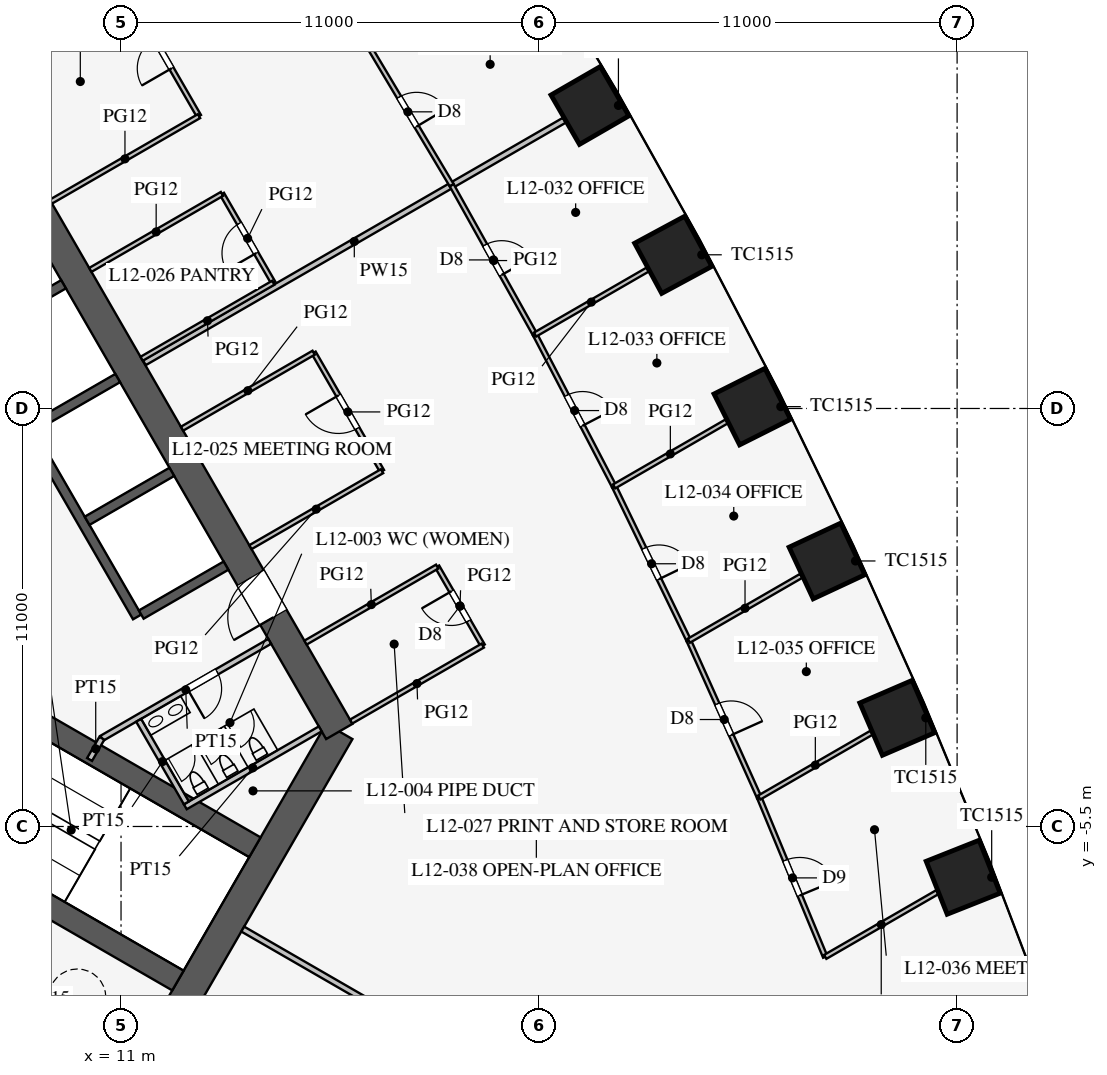
"""IFC4 building model, lengths in metres.
Left out: names, types, materials, properties, quantities, classifications, styles, units other than length and angle.
Written with IfcOpenShell. Run it as: python <this file> out.ifc"""

import sys

from ifc_helpers import new_model, si_unit, direction, frame, frame_2d, origin, origin_2d, place, context, subcontext, project, spatial, rectangle, extrude, element, fill, save


model = new_model("IFC4")
c1 = context("Model", 3, precision=1e-05, world=origin(), true_north=direction((0.0, 1.0)))
c2 = subcontext(c1, "Body", "Model", "MODEL_VIEW")
j1 = project(units=[si_unit("LENGTHUNIT", "METRE"), si_unit("PLANEANGLEUNIT", "RADIAN")], contexts=[c1])
p1 = place(None, origin())
s1 = spatial("IfcSite", under=j1, at=p1, CompositionType="ELEMENT")
p2 = place(p1, origin())
s2 = spatial("IfcBuilding", under=s1, at=p2, CompositionType="ELEMENT")
p3 = place(p2, frame((0.0, 0.0, 54.3)))
s3 = spatial("IfcBuildingStorey", under=s2, at=p3, CompositionType="ELEMENT", Elevation=54.3)
for number, where, z_axis, x_axis in (
    (1, (33.16, -6.836, 0.0), (0.0, 0.0, 1.0), (-0.369, 0.929, 0.0)),
    (2, (31.426, -2.641, 0.0), (0.0, 0.0, 1.0), (-0.396, 0.918, 0.0)),
    (3, (29.576, 1.487, 0.0), (0.0, 0.0, 1.0), (-0.423, 0.906, 0.0)),
    (4, (27.611, 5.549, 0.0), (0.0, 0.0, 1.0), (-0.449, 0.894, 0.0)),
    (5, (25.531, 9.544, 0.0), (0.0, 0.0, 1.0), (-0.475, 0.88, 0.0)),
    (6, (23.338, 13.474, 0.0), (0.0, 0.0, 1.0), (-0.5, 0.866, 0.0)),
):
    element("IfcColumn", number, at=place(p3, frame(where, z_axis=z_axis, x_axis=x_axis)), inside=s3, PredefinedType="COLUMN", context=c2, shape_type="SweptSolid", body=[
        extrude(rectangle(XDim=1.5, YDim=1.5, at=origin_2d()), origin(), (0.0, 0.0, 1.0), 4.2),
    ])
p4 = place(p3, frame((10.97, -13.0, 0.0), z_axis=(0.0, 0.0, 1.0), x_axis=(0.499995765644, 0.866027848477, 0.0)))
e7 = element("IfcWall", 7, at=p4, inside=s3, PredefinedType="SHEAR", context=c2, shape_type="SweptSolid", body=[
    extrude(rectangle(XDim=11.547, YDim=0.8, at=frame_2d((5.773, 0.0))), origin(), (0.0, 0.0, 1.0), 4.2),
])
p5 = place(p3, frame((16.743, -3.0, 0.0), z_axis=(0.0, 0.0, 1.0), x_axis=(-0.500002442456, 0.866023993627, 0.0)))
e8 = element("IfcWall", 8, at=p5, inside=s3, PredefinedType="SHEAR", context=c2, shape_type="SweptSolid", body=[
    extrude(rectangle(XDim=21.939, YDim=0.8, at=frame_2d((10.97, 0.0))), origin(), (0.0, 0.0, 1.0), 4.2),
])
p6 = place(p5, frame((17.27, 0.0, 0.0)))
e9 = element("IfcOpeningElement", 9, at=p6, cuts=e8, PredefinedType="OPENING", context=c2, shape_type="SweptSolid", body=[
    extrude(rectangle(XDim=1.2, YDim=2.1, at=frame_2d((0.6, 1.05))), frame((0.0, 0.41, 0.0), z_axis=(0.0, -1.0, 0.0), x_axis=(1.0, 0.0, 0.0)), (0.0, 0.0, 1.0), 0.82),
])
p7 = place(p5, frame((3.47, 0.0, 0.0)))
e10 = element("IfcOpeningElement", 10, at=p7, cuts=e8, PredefinedType="OPENING", context=c2, shape_type="SweptSolid", body=[
    extrude(rectangle(XDim=1.2, YDim=2.1, at=frame_2d((0.6, 1.05))), frame((0.0, 0.41, 0.0), z_axis=(0.0, -1.0, 0.0), x_axis=(1.0, 0.0, 0.0)), (0.0, 0.0, 1.0), 0.82),
])
p8 = place(p3, frame((11.424, 0.014, 0.0), z_axis=(0.0, 0.0, 1.0), x_axis=(-0.500001763848, 0.866024385424, 0.0)))
e11 = element("IfcWall", 11, at=p8, inside=s3, PredefinedType="SHEAR", context=c2, shape_type="SweptSolid", body=[
    extrude(rectangle(XDim=11.4, YDim=0.25, at=frame_2d((5.7, 0.0))), origin(), (0.0, 0.0, 1.0), 4.2),
])
for number, where, z_axis, x_axis in (
    (12, (11.532, 0.076, 0.0), (0.0, 0.0, 1.0), (0.866, 0.5, 0.0)),
    (13, (10.107, 2.544, 0.0), (0.0, 0.0, 1.0), (0.866, 0.5, 0.0)),
    (14, (8.682, 5.012, 0.0), (0.0, 0.0, 1.0), (0.866, 0.5, 0.0)),
    (15, (7.257, 7.481, 0.0), (0.0, 0.0, 1.0), (0.866, 0.5, 0.0)),
):
    element("IfcWall", number, at=place(p3, frame(where, z_axis=z_axis, x_axis=x_axis)), inside=s3, PredefinedType="SHEAR", context=c2, shape_type="SweptSolid", body=[
        extrude(rectangle(XDim=2.575, YDim=0.25, at=frame_2d((1.288, 0.0))), origin(), (0.0, 0.0, 1.0), 4.2),
    ])
for number, where, z_axis, x_axis in (
    (16, (4.638, -5.016, 0.0), (0.0, 0.0, 1.0), (0.866, -0.5, 0.0)),
    (17, (6.663, -1.509, 0.0), (0.0, 0.0, 1.0), (0.866, -0.5, 0.0)),
):
    element("IfcWall", number, at=place(p3, frame(where, z_axis=z_axis, x_axis=x_axis)), inside=s3, PredefinedType="SHEAR", context=c2, shape_type="SweptSolid", body=[
        extrude(rectangle(XDim=9.075, YDim=0.6, at=frame_2d((4.538, 0.0))), origin(), (0.0, 0.0, 1.0), 4.2),
    ])
p9 = place(p3, frame((10.495, -3.178, 0.0), z_axis=(0.0, 0.0, 1.0), x_axis=(0.86602216432, 0.500005610874, 0.0)))
e18 = element("IfcWall", 18, at=p9, inside=s3, PredefinedType="PARTITIONING", context=c2, shape_type="SweptSolid", body=[
    extrude(rectangle(XDim=5.1, YDim=0.15, at=frame_2d((2.55, 0.0))), origin(), (0.0, 0.0, 1.0), 4.0),
])
p10 = place(p9, frame((2.6, 0.0, 0.0)))
e19 = element("IfcOpeningElement", 19, at=p10, cuts=e18, PredefinedType="OPENING", context=c2, shape_type="SweptSolid", body=[
    extrude(rectangle(XDim=0.9, YDim=2.1, at=frame_2d((0.45, 1.05))), frame((0.0, 0.085, 0.0), z_axis=(0.0, -1.0, 0.0), x_axis=(1.0, 0.0, 0.0)), (0.0, 0.0, 1.0), 0.17),
])
p11 = place(p3, frame((10.495, -3.178, 0.0), z_axis=(0.0, 0.0, 1.0), x_axis=(-0.499842556608, -0.866116284689, 0.0)))
e20 = element("IfcWall", 20, at=p11, inside=s3, PredefinedType="PARTITIONING", context=c2, shape_type="SweptSolid", body=[
    extrude(rectangle(XDim=0.645, YDim=0.15, at=frame_2d((0.323, 0.0))), origin(), (0.0, 0.0, 1.0), 4.0),
])
p12 = place(p3, frame((12.691, -4.982, 0.0), z_axis=(0.0, 0.0, 1.0), x_axis=(0.8660249478, 0.500000789788, 0.0)))
e21 = element("IfcWall", 21, at=p12, inside=s3, PredefinedType="PARTITIONING", context=c2, shape_type="SweptSolid", body=[
    extrude(rectangle(XDim=4.1, YDim=0.15, at=frame_2d((2.05, 0.0))), origin(), (0.0, 0.0, 1.0), 4.0),
])
p13 = place(p3, frame((11.464, -2.706, 0.0), z_axis=(0.0, 0.0, 1.0), x_axis=(0.50001992892, -0.866013897511, 0.0)))
e22 = element("IfcWall", 22, at=p13, inside=s3, PredefinedType="PARTITIONING", context=c2, shape_type="SweptSolid", body=[
    extrude(rectangle(XDim=2.51, YDim=0.15, at=frame_2d((1.255, 0.0))), origin(), (0.0, 0.0, 1.0), 4.0),
])
p14 = place(p3, frame((14.203, -8.2, 0.0), z_axis=(0.0, 0.0, 1.0), x_axis=(0.866024965723, -0.500000758745, 0.0)))
e23 = element("IfcWall", 23, at=p14, inside=s3, PredefinedType="PARTITIONING", context=c2, shape_type="SweptSolid", body=[
    extrude(rectangle(XDim=18.25, YDim=0.15, at=frame_2d((9.125, 0.0))), origin(), (0.0, 0.0, 1.0), 2.3),
])
p15 = place(p3, frame((11.613, 6.705, 0.0), z_axis=(0.0, 0.0, 1.0), x_axis=(0.86602785495, 0.499995754432, 0.0)))
e24 = element("IfcWall", 24, at=p15, inside=s3, PredefinedType="PARTITIONING", context=c2, shape_type="SweptSolid", body=[
    extrude(rectangle(XDim=12.759, YDim=0.15, at=frame_2d((6.379, 0.0))), origin(), (0.0, 0.0, 1.0), 3.2),
])
p16 = place(p3, frame((15.006, 8.808, 0.0), z_axis=(0.0, 0.0, 1.0), x_axis=(-0.500048589285, 0.86599734893, 0.0)))
e25 = element("IfcWall", 25, at=p16, inside=s3, PredefinedType="PARTITIONING", context=c2, shape_type="SweptSolid", body=[
    extrude(rectangle(XDim=2.7, YDim=0.12, at=frame_2d((1.35, 0.0))), origin(), (0.0, 0.0, 1.0), 2.9),
])
p17 = place(p16, frame((0.9, 0.0, 0.15)))
e26 = element("IfcOpeningElement", 26, at=p17, cuts=e25, PredefinedType="OPENING", context=c2, shape_type="SweptSolid", body=[
    extrude(rectangle(XDim=0.9, YDim=2.1, at=frame_2d((0.45, 1.05))), frame((0.0, 0.07, 0.0), z_axis=(0.0, -1.0, 0.0), x_axis=(1.0, 0.0, 0.0)), (0.0, 0.0, 1.0), 0.14),
])
p18 = place(p3, frame((13.052, 13.194, 0.0), z_axis=(0.0, 0.0, 1.0), x_axis=(-0.499977259774, 0.866038532462, 0.0)))
e27 = element("IfcWall", 27, at=p18, inside=s3, PredefinedType="PARTITIONING", context=c2, shape_type="SweptSolid", body=[
    extrude(rectangle(XDim=4.7, YDim=0.12, at=frame_2d((2.35, 0.0))), origin(), (0.0, 0.0, 1.0), 2.9),
])
p19 = place(p18, frame((1.45, 0.0, 0.15)))
e28 = element("IfcOpeningElement", 28, at=p19, cuts=e27, PredefinedType="OPENING", context=c2, shape_type="SweptSolid", body=[
    extrude(rectangle(XDim=1.8, YDim=2.1, at=frame_2d((0.9, 1.05))), frame((0.0, 0.07, 0.0), z_axis=(0.0, -1.0, 0.0), x_axis=(1.0, 0.0, 0.0)), (0.0, 0.0, 1.0), 0.14),
])
p20 = place(p3, frame((20.519, -0.74, 0.0), z_axis=(0.0, 0.0, 1.0), x_axis=(-0.499957262057, 0.866050077142, 0.0)))
e29 = element("IfcWall", 29, at=p20, inside=s3, PredefinedType="PARTITIONING", context=c2, shape_type="SweptSolid", body=[
    extrude(rectangle(XDim=2.4, YDim=0.12, at=frame_2d((1.2, 0.0))), origin(), (0.0, 0.0, 1.0), 2.9),
])
p21 = place(p20, frame((0.75, 0.0, 0.15)))
e30 = element("IfcOpeningElement", 30, at=p21, cuts=e29, PredefinedType="OPENING", context=c2, shape_type="SweptSolid", body=[
    extrude(rectangle(XDim=0.9, YDim=2.1, at=frame_2d((0.45, 1.05))), frame((0.0, 0.07, 0.0), z_axis=(0.0, -1.0, 0.0), x_axis=(1.0, 0.0, 0.0)), (0.0, 0.0, 1.0), 0.14),
])
p22 = place(p3, frame((17.869, 3.85, 0.0), z_axis=(0.0, 0.0, 1.0), x_axis=(-0.500012057535, 0.866018442252, 0.0)))
e31 = element("IfcWall", 31, at=p22, inside=s3, PredefinedType="PARTITIONING", context=c2, shape_type="SweptSolid", body=[
    extrude(rectangle(XDim=3.6, YDim=0.12, at=frame_2d((1.8, 0.0))), origin(), (0.0, 0.0, 1.0), 2.9),
])
p23 = place(p22, frame((1.3, 0.0, 0.15)))
e32 = element("IfcOpeningElement", 32, at=p23, cuts=e31, PredefinedType="OPENING", context=c2, shape_type="SweptSolid", body=[
    extrude(rectangle(XDim=1.0, YDim=2.1, at=frame_2d((0.5, 1.05))), frame((0.0, 0.07, 0.0), z_axis=(0.0, -1.0, 0.0), x_axis=(1.0, 0.0, 0.0)), (0.0, 0.0, 1.0), 0.14),
])
for number, where, z_axis, x_axis in (
    (33, (11.542, 6.808, 0.0), (0.0, 0.0, 1.0), (0.866, 0.5, 0.0)),
    (34, (10.192, 9.146, 0.0), (0.0, 0.0, 1.0), (0.866, 0.5, 0.0)),
):
    element("IfcWall", number, at=place(p3, frame(where, z_axis=z_axis, x_axis=x_axis)), inside=s3, PredefinedType="PARTITIONING", context=c2, shape_type="SweptSolid", body=[
        extrude(rectangle(XDim=4.0, YDim=0.12, at=frame_2d((2.0, 0.0))), origin(), (0.0, 0.0, 1.0), 2.9),
    ])
p24 = place(p3, frame((9.155, 10.944, 0.0), z_axis=(0.0, 0.0, 1.0), x_axis=(0.866017533419, 0.500013631625, 0.0)))
e35 = element("IfcWall", 35, at=p24, inside=s3, PredefinedType="PARTITIONING", context=c2, shape_type="SweptSolid", body=[
    extrude(rectangle(XDim=4.5, YDim=0.12, at=frame_2d((2.25, 0.0))), origin(), (0.0, 0.0, 1.0), 2.9),
])
for number, where, z_axis, x_axis in (
    (36, (17.055, -2.74, 0.0), (0.0, 0.0, 1.0), (0.866, 0.5, 0.0)),
    (37, (12.605, 4.968, 0.0), (0.0, 0.0, 1.0), (0.866, 0.5, 0.0)),
    (38, (14.405, 1.85, 0.0), (0.0, 0.0, 1.0), (0.866, 0.5, 0.0)),
    (39, (15.855, -0.661, 0.0), (0.0, 0.0, 1.0), (0.866, 0.5, 0.0)),
):
    element("IfcWall", number, at=place(p3, frame(where, z_axis=z_axis, x_axis=x_axis)), inside=s3, PredefinedType="PARTITIONING", context=c2, shape_type="SweptSolid", body=[
        extrude(rectangle(XDim=4.0, YDim=0.12, at=frame_2d((2.0, 0.0))), origin(), (0.0, 0.0, 1.0), 2.9),
    ])
p25 = place(p3, frame((19.701, 11.374, 0.0), z_axis=(0.0, 0.0, 1.0), x_axis=(-0.512483962191, 0.858696796604, 0.0)))
e40 = element("IfcWall", 40, at=p25, inside=s3, PredefinedType="PARTITIONING", context=c2, shape_type="SweptSolid", body=[
    extrude(rectangle(XDim=4.5, YDim=0.12, at=frame_2d((2.25, 0.0))), origin(), (0.0, 0.0, 1.0), 2.9),
])
p26 = place(p25, frame((1.8, 0.0, 0.15)))
e41 = element("IfcOpeningElement", 41, at=p26, cuts=e40, PredefinedType="OPENING", context=c2, shape_type="SweptSolid", body=[
    extrude(rectangle(XDim=0.9, YDim=2.1, at=frame_2d((0.45, 1.05))), frame((0.0, 0.07, 0.0), z_axis=(0.0, -1.0, 0.0), x_axis=(1.0, 0.0, 0.0)), (0.0, 0.0, 1.0), 0.14),
])
p27 = place(p3, frame((25.941, -0.611, 0.0), z_axis=(0.0, 0.0, 1.0), x_axis=(-0.435857917556, 0.900015486369, 0.0)))
e42 = element("IfcWall", 42, at=p27, inside=s3, PredefinedType="PARTITIONING", context=c2, shape_type="SweptSolid", body=[
    extrude(rectangle(XDim=4.512, YDim=0.12, at=frame_2d((2.256, 0.0))), origin(), (0.0, 0.0, 1.0), 2.9),
])
p28 = place(p27, frame((1.8, 0.0, 0.15)))
e43 = element("IfcOpeningElement", 43, at=p28, cuts=e42, PredefinedType="OPENING", context=c2, shape_type="SweptSolid", body=[
    extrude(rectangle(XDim=0.9, YDim=2.1, at=frame_2d((0.45, 1.05))), frame((0.0, 0.07, 0.0), z_axis=(0.0, -1.0, 0.0), x_axis=(1.0, 0.0, 0.0)), (0.0, 0.0, 1.0), 0.14),
])
p29 = place(p3, frame((27.793, -4.738, 0.0), z_axis=(0.0, 0.0, 1.0), x_axis=(-0.409451055745, 0.912332084796, 0.0)))
e44 = element("IfcWall", 44, at=p29, inside=s3, PredefinedType="PARTITIONING", context=c2, shape_type="SweptSolid", body=[
    extrude(rectangle(XDim=4.523, YDim=0.12, at=frame_2d((2.262, 0.0))), origin(), (0.0, 0.0, 1.0), 2.9),
])
p30 = place(p29, frame((1.8, 0.0, 0.15)))
e45 = element("IfcOpeningElement", 45, at=p30, cuts=e44, PredefinedType="OPENING", context=c2, shape_type="SweptSolid", body=[
    extrude(rectangle(XDim=0.9, YDim=2.1, at=frame_2d((0.45, 1.05))), frame((0.0, 0.07, 0.0), z_axis=(0.0, -1.0, 0.0), x_axis=(1.0, 0.0, 0.0)), (0.0, 0.0, 1.0), 0.14),
])
p31 = place(p3, frame((29.53, -8.932, 0.0), z_axis=(0.0, 0.0, 1.0), x_axis=(-0.382639984525, 0.923897527999, 0.0)))
e46 = element("IfcWall", 46, at=p31, inside=s3, PredefinedType="PARTITIONING", context=c2, shape_type="SweptSolid", body=[
    extrude(rectangle(XDim=4.539, YDim=0.12, at=frame_2d((2.27, 0.0))), origin(), (0.0, 0.0, 1.0), 2.9),
])
p32 = place(p31, frame((1.75, 0.0, 0.15)))
e47 = element("IfcOpeningElement", 47, at=p32, cuts=e46, PredefinedType="OPENING", context=c2, shape_type="SweptSolid", body=[
    extrude(rectangle(XDim=1.0, YDim=2.1, at=frame_2d((0.5, 1.05))), frame((0.0, 0.07, 0.0), z_axis=(0.0, -1.0, 0.0), x_axis=(1.0, 0.0, 0.0)), (0.0, 0.0, 1.0), 0.14),
])
p33 = place(p3, frame((21.895, 7.445, 0.0), z_axis=(0.0, 0.0, 1.0), x_axis=(-0.487415216275, 0.87317031955, 0.0)))
e48 = element("IfcWall", 48, at=p33, inside=s3, PredefinedType="PARTITIONING", context=c2, shape_type="SweptSolid", body=[
    extrude(rectangle(XDim=4.5, YDim=0.12, at=frame_2d((2.25, 0.0))), origin(), (0.0, 0.0, 1.0), 2.9),
])
p34 = place(p33, frame((1.8, 0.0, 0.15)))
e49 = element("IfcOpeningElement", 49, at=p34, cuts=e48, PredefinedType="OPENING", context=c2, shape_type="SweptSolid", body=[
    extrude(rectangle(XDim=0.9, YDim=2.1, at=frame_2d((0.45, 1.05))), frame((0.0, 0.07, 0.0), z_axis=(0.0, -1.0, 0.0), x_axis=(1.0, 0.0, 0.0)), (0.0, 0.0, 1.0), 0.14),
])
p35 = place(p3, frame((23.975, 3.449, 0.0), z_axis=(0.0, 0.0, 1.0), x_axis=(-0.461810056307, 0.886978845235, 0.0)))
e50 = element("IfcWall", 50, at=p35, inside=s3, PredefinedType="PARTITIONING", context=c2, shape_type="SweptSolid", body=[
    extrude(rectangle(XDim=4.504, YDim=0.12, at=frame_2d((2.252, 0.0))), origin(), (0.0, 0.0, 1.0), 2.9),
])
p36 = place(p35, frame((1.8, 0.0, 0.15)))
e51 = element("IfcOpeningElement", 51, at=p36, cuts=e50, PredefinedType="OPENING", context=c2, shape_type="SweptSolid", body=[
    extrude(rectangle(XDim=0.9, YDim=2.1, at=frame_2d((0.45, 1.05))), frame((0.0, 0.07, 0.0), z_axis=(0.0, -1.0, 0.0), x_axis=(1.0, 0.0, 0.0)), (0.0, 0.0, 1.0), 0.14),
])
p37 = place(p3, frame((25.941, -0.611, 0.0), z_axis=(0.0, 0.0, 1.0), x_axis=(0.866016478054, 0.500015459501, 0.0)))
e52 = element("IfcWall", 52, at=p37, inside=s3, PredefinedType="PARTITIONING", context=c2, shape_type="SweptSolid", body=[
    extrude(rectangle(XDim=3.414, YDim=0.12, at=frame_2d((1.707, 0.0))), origin(), (0.0, 0.0, 1.0), 2.9),
])
p38 = place(p3, frame((27.793, -4.738, 0.0), z_axis=(0.0, 0.0, 1.0), x_axis=(0.866040105854, 0.499974534403, 0.0)))
e53 = element("IfcWall", 53, at=p38, inside=s3, PredefinedType="PARTITIONING", context=c2, shape_type="SweptSolid", body=[
    extrude(rectangle(XDim=3.409, YDim=0.12, at=frame_2d((1.705, 0.0))), origin(), (0.0, 0.0, 1.0), 2.9),
])
p39 = place(p3, frame((29.53, -8.932, 0.0), z_axis=(0.0, 0.0, 1.0), x_axis=(0.866018335219, 0.500012242915, 0.0)))
e54 = element("IfcWall", 54, at=p39, inside=s3, PredefinedType="PARTITIONING", context=c2, shape_type="SweptSolid", body=[
    extrude(rectangle(XDim=3.403, YDim=0.12, at=frame_2d((1.702, 0.0))), origin(), (0.0, 0.0, 1.0), 2.9),
])
p40 = place(p3, frame((21.895, 7.445, 0.0), z_axis=(0.0, 0.0, 1.0), x_axis=(0.866015553834, 0.500017060227, 0.0)))
e55 = element("IfcWall", 55, at=p40, inside=s3, PredefinedType="PARTITIONING", context=c2, shape_type="SweptSolid", body=[
    extrude(rectangle(XDim=3.419, YDim=0.12, at=frame_2d((1.71, 0.0))), origin(), (0.0, 0.0, 1.0), 2.9),
])
p41 = place(p3, frame((23.975, 3.449, 0.0), z_axis=(0.0, 0.0, 1.0), x_axis=(0.866014265796, 0.500019291066, 0.0)))
e56 = element("IfcWall", 56, at=p41, inside=s3, PredefinedType="PARTITIONING", context=c2, shape_type="SweptSolid", body=[
    extrude(rectangle(XDim=3.417, YDim=0.12, at=frame_2d((1.708, 0.0))), origin(), (0.0, 0.0, 1.0), 2.9),
])
p42 = place(p10, frame((0.9, 0.0, 0.0), z_axis=(0.0, 0.0, 1.0), x_axis=(-1.0, 0.0, 0.0)))
e57 = element("IfcDoor", 57, at=p42, inside=s3, OperationType="SINGLE_SWING_RIGHT", PredefinedType="DOOR", context=c2, shape_type="SweptSolid", body=[
    extrude(rectangle(XDim=0.9, YDim=2.1, at=frame_2d((0.45, 1.05))), frame((0.0, 0.025, 0.0), z_axis=(0.0, -1.0, 0.0), x_axis=(1.0, 0.0, 0.0)), (0.0, 0.0, 1.0), 0.05),
])
fill(e19, e57)
p43 = place(p7, origin())
e58 = element("IfcDoor", 58, at=p43, inside=s3, OperationType="SINGLE_SWING_LEFT", PredefinedType="DOOR", context=c2, shape_type="SweptSolid", body=[
    extrude(rectangle(XDim=1.2, YDim=2.1, at=frame_2d((0.6, 1.05))), frame((0.0, 0.025, 0.0), z_axis=(0.0, -1.0, 0.0), x_axis=(1.0, 0.0, 0.0)), (0.0, 0.0, 1.0), 0.05),
])
fill(e10, e58)
p44 = place(p19, origin())
e59 = element("IfcDoor", 59, at=p44, inside=s3, OperationType="DOUBLE_DOOR_SINGLE_SWING", PredefinedType="DOOR", context=c2, shape_type="SweptSolid", body=[
    extrude(rectangle(XDim=1.8, YDim=2.1, at=frame_2d((0.9, 1.05))), frame((0.0, 0.025, 0.0), z_axis=(0.0, -1.0, 0.0), x_axis=(1.0, 0.0, 0.0)), (0.0, 0.0, 1.0), 0.05),
])
fill(e28, e59)
p45 = place(p23, origin())
e60 = element("IfcDoor", 60, at=p45, inside=s3, OperationType="SINGLE_SWING_RIGHT", PredefinedType="DOOR", context=c2, shape_type="SweptSolid", body=[
    extrude(rectangle(XDim=1.0, YDim=2.1, at=frame_2d((0.5, 1.05))), frame((0.0, 0.025, 0.0), z_axis=(0.0, -1.0, 0.0), x_axis=(1.0, 0.0, 0.0)), (0.0, 0.0, 1.0), 0.05),
])
fill(e32, e60)
p46 = place(p17, origin())
e61 = element("IfcDoor", 61, at=p46, inside=s3, OperationType="SINGLE_SWING_LEFT", PredefinedType="DOOR", context=c2, shape_type="SweptSolid", body=[
    extrude(rectangle(XDim=0.9, YDim=2.1, at=frame_2d((0.45, 1.05))), frame((0.0, 0.025, 0.0), z_axis=(0.0, -1.0, 0.0), x_axis=(1.0, 0.0, 0.0)), (0.0, 0.0, 1.0), 0.05),
])
fill(e26, e61)
p47 = place(p21, origin())
e62 = element("IfcDoor", 62, at=p47, inside=s3, OperationType="SINGLE_SWING_RIGHT", PredefinedType="DOOR", context=c2, shape_type="SweptSolid", body=[
    extrude(rectangle(XDim=0.9, YDim=2.1, at=frame_2d((0.45, 1.05))), frame((0.0, 0.025, 0.0), z_axis=(0.0, -1.0, 0.0), x_axis=(1.0, 0.0, 0.0)), (0.0, 0.0, 1.0), 0.05),
])
fill(e30, e62)
p48 = place(p26, frame((0.9, 0.0, 0.0), z_axis=(0.0, 0.0, 1.0), x_axis=(-1.0, 0.0, 0.0)))
e63 = element("IfcDoor", 63, at=p48, inside=s3, OperationType="SINGLE_SWING_RIGHT", PredefinedType="DOOR", context=c2, shape_type="SweptSolid", body=[
    extrude(rectangle(XDim=0.9, YDim=2.1, at=frame_2d((0.45, 1.05))), frame((0.0, 0.025, 0.0), z_axis=(0.0, -1.0, 0.0), x_axis=(1.0, 0.0, 0.0)), (0.0, 0.0, 1.0), 0.05),
])
fill(e41, e63)
p49 = place(p34, frame((0.9, 0.0, 0.0), z_axis=(0.0, 0.0, 1.0), x_axis=(-1.0, 0.0, 0.0)))
e64 = element("IfcDoor", 64, at=p49, inside=s3, OperationType="SINGLE_SWING_RIGHT", PredefinedType="DOOR", context=c2, shape_type="SweptSolid", body=[
    extrude(rectangle(XDim=0.9, YDim=2.1, at=frame_2d((0.45, 1.05))), frame((0.0, 0.025, 0.0), z_axis=(0.0, -1.0, 0.0), x_axis=(1.0, 0.0, 0.0)), (0.0, 0.0, 1.0), 0.05),
])
fill(e49, e64)
p50 = place(p36, frame((0.9, 0.0, 0.0), z_axis=(0.0, 0.0, 1.0), x_axis=(-1.0, 0.0, 0.0)))
e65 = element("IfcDoor", 65, at=p50, inside=s3, OperationType="SINGLE_SWING_RIGHT", PredefinedType="DOOR", context=c2, shape_type="SweptSolid", body=[
    extrude(rectangle(XDim=0.9, YDim=2.1, at=frame_2d((0.45, 1.05))), frame((0.0, 0.025, 0.0), z_axis=(0.0, -1.0, 0.0), x_axis=(1.0, 0.0, 0.0)), (0.0, 0.0, 1.0), 0.05),
])
fill(e51, e65)
p51 = place(p28, frame((0.9, 0.0, 0.0), z_axis=(0.0, 0.0, 1.0), x_axis=(-1.0, 0.0, 0.0)))
e66 = element("IfcDoor", 66, at=p51, inside=s3, OperationType="SINGLE_SWING_RIGHT", PredefinedType="DOOR", context=c2, shape_type="SweptSolid", body=[
    extrude(rectangle(XDim=0.9, YDim=2.1, at=frame_2d((0.45, 1.05))), frame((0.0, 0.025, 0.0), z_axis=(0.0, -1.0, 0.0), x_axis=(1.0, 0.0, 0.0)), (0.0, 0.0, 1.0), 0.05),
])
fill(e43, e66)
p52 = place(p30, frame((0.9, 0.0, 0.0), z_axis=(0.0, 0.0, 1.0), x_axis=(-1.0, 0.0, 0.0)))
e67 = element("IfcDoor", 67, at=p52, inside=s3, OperationType="SINGLE_SWING_RIGHT", PredefinedType="DOOR", context=c2, shape_type="SweptSolid", body=[
    extrude(rectangle(XDim=0.9, YDim=2.1, at=frame_2d((0.45, 1.05))), frame((0.0, 0.025, 0.0), z_axis=(0.0, -1.0, 0.0), x_axis=(1.0, 0.0, 0.0)), (0.0, 0.0, 1.0), 0.05),
])
fill(e45, e67)
p53 = place(p32, frame((1.0, 0.0, 0.0), z_axis=(0.0, 0.0, 1.0), x_axis=(-1.0, 0.0, 0.0)))
e68 = element("IfcDoor", 68, at=p53, inside=s3, OperationType="SINGLE_SWING_RIGHT", PredefinedType="DOOR", context=c2, shape_type="SweptSolid", body=[
    extrude(rectangle(XDim=1.0, YDim=2.1, at=frame_2d((0.5, 1.05))), frame((0.0, 0.025, 0.0), z_axis=(0.0, -1.0, 0.0), x_axis=(1.0, 0.0, 0.0)), (0.0, 0.0, 1.0), 0.05),
])
fill(e47, e68)
save(model, sys.argv[1])
